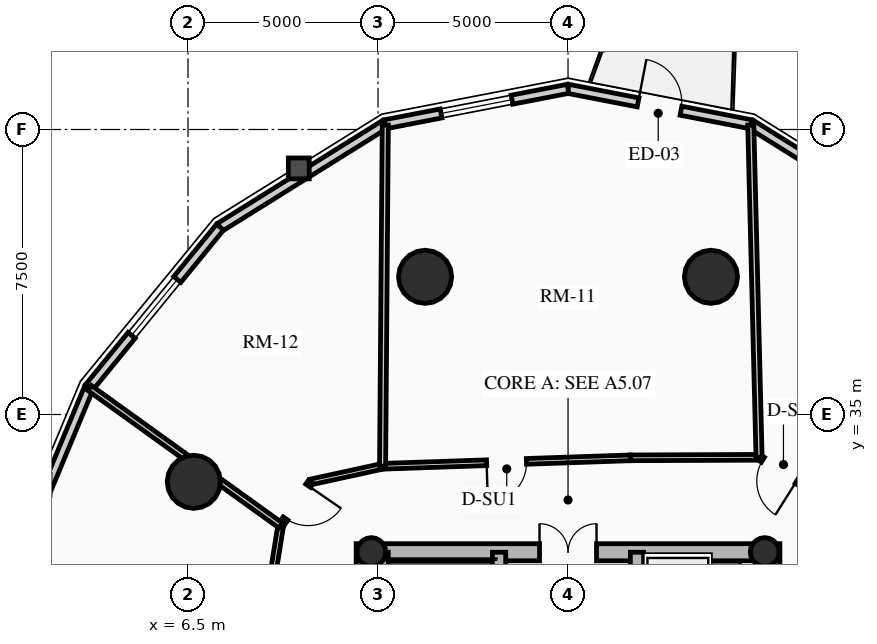
"""IFC4 building model, lengths in metres.
Left out: names, types, materials, properties, quantities, classifications, styles, units other than length and angle.
Written with IfcOpenShell. Run it as: python <this file> out.ifc"""

import sys

from ifc_helpers import new_model, si_unit, direction, frame, frame_2d, origin, origin_2d, place, context, subcontext, project, spatial, rectangle, circle, hollow_circle, extrude, source, transform, mapped, element, fill, save


model = new_model("IFC4")
c1 = context("Model", 3, precision=1e-05, world=origin(), true_north=direction((0.0, 1.0)))
c2 = subcontext(c1, "Body", "Model", "MODEL_VIEW")
j1 = project(units=[si_unit("LENGTHUNIT", "METRE"), si_unit("PLANEANGLEUNIT", "RADIAN")], contexts=[c1])
p1 = place(None, origin())
s1 = spatial("IfcSite", under=j1, at=p1, CompositionType="ELEMENT")
p2 = place(p1, origin())
s2 = spatial("IfcBuilding", under=s1, at=p2, CompositionType="ELEMENT")
p3 = place(p2, frame((0.0, 0.0, 78.88)))
s3 = spatial("IfcBuildingStorey", under=s2, at=p3, CompositionType="ELEMENT", Elevation=78.88)
for number, where, z_axis, x_axis in (
    (1, (11.15, 17.4, 0.0), (0.0, 0.0, 1.0), (0.0, 1.0, 0.0)),
    (2, (21.85, 17.4, 0.0), (0.0, 0.0, 1.0), (0.0, 1.0, 0.0)),
):
    element("IfcWall", number, at=place(p3, frame(where, z_axis=z_axis, x_axis=x_axis)), inside=s3, PredefinedType="SHEAR", context=c2, shape_type="SweptSolid", body=[
        extrude(rectangle(XDim=14.2, YDim=0.45, at=frame_2d((7.1, 0.0))), origin(), (0.0, 0.0, 1.0), 2.91),
    ])
p4 = place(p3, frame((11.15, 31.375, 0.0), z_axis=(0.0, 0.0, 1.0), x_axis=(1.0, 0.0, 0.0)))
e3 = element("IfcWall", 3, at=p4, inside=s3, PredefinedType="SHEAR", context=c2, shape_type="SweptSolid", body=[
    extrude(rectangle(XDim=10.7, YDim=0.45, at=frame_2d((5.35, 0.0))), origin(), (0.0, 0.0, 1.0), 2.91),
])
m1 = source(origin(), c2, "Body", "SweptSolid", [
    extrude(rectangle(XDim=1.5, YDim=2.02, at=frame_2d((0.75, 1.01))), frame((0.0, 0.235, 0.0), z_axis=(0.0, -1.0, 0.0), x_axis=(1.0, 0.0, 0.0)), (0.0, 0.0, 1.0), 0.47),
])
p5 = place(p4, frame((4.6, 0.0, 0.0)))
e4 = element("IfcOpeningElement", 4, at=p5, cuts=e3, PredefinedType="OPENING", context=c2, shape_type="MappedRepresentation", body=[
    mapped(m1, transform((0.0, 0.0, 0.0), x_axis=(1.0, 0.0, 0.0), y_axis=(0.0, 1.0, 0.0), z_axis=(0.0, 0.0, 1.0), scale=1.0)),
])
p6 = place(p3, frame((14.685, 17.625, 0.0), z_axis=(0.0, 0.0, 1.0), x_axis=(0.0, 1.0, 0.0)))
e5 = element("IfcWall", 5, at=p6, inside=s3, PredefinedType="SHEAR", context=c2, shape_type="SweptSolid", body=[
    extrude(rectangle(XDim=13.75, YDim=0.35, at=frame_2d((6.875, 0.0))), origin(), (0.0, 0.0, 1.0), 2.91),
])
m2 = source(origin(), c2, "Body", "SweptSolid", [
    extrude(rectangle(XDim=1.1, YDim=2.015, at=frame_2d((0.55, 1.007))), frame((0.0, 0.185, 0.0), z_axis=(0.0, -1.0, 0.0), x_axis=(1.0, 0.0, 0.0)), (0.0, 0.0, 1.0), 0.37),
])
p7 = place(p6, frame((4.875, 0.0, 0.0)))
e6 = element("IfcOpeningElement", 6, at=p7, cuts=e5, PredefinedType="OPENING", context=c2, shape_type="MappedRepresentation", body=[
    mapped(m2, transform((0.0, 0.0, 0.0), x_axis=(1.0, 0.0, 0.0), y_axis=(0.0, 1.0, 0.0), z_axis=(0.0, 0.0, 1.0), scale=1.0)),
])
m3 = source(origin(), c2, "Body", "SweptSolid", [
    extrude(rectangle(XDim=1.15, YDim=2.02, at=frame_2d((0.575, 1.01))), frame((0.0, 0.185, 0.0), z_axis=(0.0, -1.0, 0.0), x_axis=(1.0, 0.0, 0.0)), (0.0, 0.0, 1.0), 0.37),
])
p8 = place(p6, frame((7.295, 0.0, 0.0)))
e7 = element("IfcOpeningElement", 7, at=p8, cuts=e5, PredefinedType="OPENING", context=c2, shape_type="MappedRepresentation", body=[
    mapped(m3, transform((0.0, 0.0, 0.0), x_axis=(1.0, 0.0, 0.0), y_axis=(0.0, 1.0, 0.0), z_axis=(0.0, 0.0, 1.0), scale=1.0)),
])
p9 = place(p3, frame((18.315, 17.625, 0.0), z_axis=(0.0, 0.0, 1.0), x_axis=(0.0, 1.0, 0.0)))
e8 = element("IfcWall", 8, at=p9, inside=s3, PredefinedType="SHEAR", context=c2, shape_type="SweptSolid", body=[
    extrude(rectangle(XDim=13.75, YDim=0.35, at=frame_2d((6.875, 0.0))), origin(), (0.0, 0.0, 1.0), 2.91),
])
p10 = place(p9, frame((10.0, 0.0, 0.0)))
e9 = element("IfcOpeningElement", 9, at=p10, cuts=e8, PredefinedType="OPENING", context=c2, shape_type="MappedRepresentation", body=[
    mapped(m2, transform((0.0, 0.0, 0.0), x_axis=(1.0, 0.0, 0.0), y_axis=(0.0, 1.0, 0.0), z_axis=(0.0, 0.0, 1.0), scale=1.0)),
])
p11 = place(p9, frame((12.0, 0.0, 0.0)))
e10 = element("IfcOpeningElement", 10, at=p11, cuts=e8, PredefinedType="OPENING", context=c2, shape_type="MappedRepresentation", body=[
    mapped(m2, transform((0.0, 0.0, 0.0), x_axis=(1.0, 0.0, 0.0), y_axis=(0.0, 1.0, 0.0), z_axis=(0.0, 0.0, 1.0), scale=1.0)),
])
p12 = place(p9, frame((5.305, 0.0, 0.0)))
e11 = element("IfcOpeningElement", 11, at=p12, cuts=e8, PredefinedType="OPENING", context=c2, shape_type="MappedRepresentation", body=[
    mapped(m3, transform((0.0, 0.0, 0.0), x_axis=(1.0, 0.0, 0.0), y_axis=(0.0, 1.0, 0.0), z_axis=(0.0, 0.0, 1.0), scale=1.0)),
])
p13 = place(p3, frame((11.595, 24.655, 0.0), z_axis=(0.0, 0.0, 1.0), x_axis=(0.0, 1.0, 0.0)))
e12 = element("IfcWall", 12, at=p13, inside=s3, PredefinedType="SHEAR", context=c2, shape_type="SweptSolid", body=[
    extrude(rectangle(XDim=6.72, YDim=0.35, at=frame_2d((3.36, 0.0))), origin(), (0.0, 0.0, 1.0), 2.91),
])
for number, where, z_axis, x_axis in (
    (13, (11.325, 31.38, 0.0), (0.0, 0.0, 1.0), (1.0, 0.0, 0.0)),
    (14, (21.675, 31.38, 0.0), (0.0, 0.0, 1.0), (1.0, 0.0, 0.0)),
):
    element("IfcColumn", number, at=place(p3, frame(where, z_axis=z_axis, x_axis=x_axis)), inside=s3, PredefinedType="COLUMN", context=c2, shape_type="SweptSolid", body=[
        extrude(hollow_circle(Radius=0.38, WallThickness=0.032, at=origin_2d()), origin(), (0.0, 0.0, 1.0), 2.91),
    ])
for number, where, z_axis, x_axis in (
    (15, (20.261, 38.623, 0.0), (0.0, 0.0, 1.0), (1.0, 0.0, 0.0)),
    (16, (12.739, 38.623, 0.0), (0.0, 0.0, 1.0), (1.0, 0.0, 0.0)),
    (17, (6.653, 33.229, 0.0), (0.0, 0.0, 1.0), (1.0, 0.0, 0.0)),
):
    element("IfcColumn", number, at=place(p3, frame(where, z_axis=z_axis, x_axis=x_axis)), inside=s3, PredefinedType="USERDEFINED", context=c2, shape_type="SweptSolid", body=[
        extrude(circle(Radius=0.7, at=origin_2d()), origin(), (0.0, 0.0, 1.0), 2.91),
    ])
p14 = place(p3, frame((21.315, 42.637, 0.0), z_axis=(0.0, 0.0, 1.0), x_axis=(0.848520380187, -0.529162701263, 0.0)))
e18 = element("IfcWall", 18, at=p14, inside=s3, PredefinedType="SOLIDWALL", context=c2, shape_type="SweptSolid", body=[
    extrude(rectangle(XDim=5.119, YDim=0.24, at=frame_2d((2.56, 0.0))), origin(), (0.0, 0.0, 1.0), 2.179),
])
p15 = place(p3, frame((16.5, 43.57, 0.0), z_axis=(0.0, 0.0, 1.0), x_axis=(0.981723785992, -0.190311344954, 0.0)))
e19 = element("IfcWall", 19, at=p15, inside=s3, PredefinedType="SOLIDWALL", context=c2, shape_type="SweptSolid", body=[
    extrude(rectangle(XDim=4.904, YDim=0.24, at=frame_2d((2.452, 0.0))), origin(), (0.0, 0.0, 1.0), 2.179),
])
m4 = source(origin(), c2, "Body", "SweptSolid", [
    extrude(rectangle(XDim=1.15, YDim=2.005, at=frame_2d((0.575, 1.002))), frame((0.0, 0.13, 0.0), z_axis=(0.0, -1.0, 0.0), x_axis=(1.0, 0.0, 0.0)), (0.0, 0.0, 1.0), 0.26),
])
p16 = place(p15, frame((1.877, 0.0, 0.0)))
e20 = element("IfcOpeningElement", 20, at=p16, cuts=e19, PredefinedType="OPENING", context=c2, shape_type="MappedRepresentation", body=[
    mapped(m4, transform((0.0, 0.0, 0.0), x_axis=(1.0, 0.0, 0.0), y_axis=(0.0, 1.0, 0.0), z_axis=(0.0, 0.0, 1.0), scale=1.0)),
])
p17 = place(p3, frame((11.685, 42.637, 0.0), z_axis=(0.0, 0.0, 1.0), x_axis=(0.981723785992, 0.190311344954, 0.0)))
e21 = element("IfcWall", 21, at=p17, inside=s3, PredefinedType="SOLIDWALL", context=c2, shape_type="SweptSolid", body=[
    extrude(rectangle(XDim=4.904, YDim=0.24, at=frame_2d((2.452, 0.0))), origin(), (0.0, 0.0, 1.0), 2.179),
])
m5 = source(origin(), c2, "Body", "SweptSolid", [
    extrude(rectangle(XDim=1.9, YDim=1.35, at=frame_2d((0.95, 0.675))), frame((0.0, 0.13, 0.0), z_axis=(0.0, -1.0, 0.0), x_axis=(1.0, 0.0, 0.0)), (0.0, 0.0, 1.0), 0.26),
])
p18 = place(p17, frame((1.502, 0.0, 0.65)))
e22 = element("IfcOpeningElement", 22, at=p18, cuts=e21, PredefinedType="OPENING", context=c2, shape_type="MappedRepresentation", body=[
    mapped(m5, transform((0.0, 0.0, 0.0), x_axis=(1.0, 0.0, 0.0), y_axis=(0.0, 1.0, 0.0), z_axis=(0.0, 0.0, 1.0), scale=1.0)),
])
p19 = place(p3, frame((7.342, 39.928, 0.0), z_axis=(0.0, 0.0, 1.0), x_axis=(0.848520380187, 0.529162701263, 0.0)))
e23 = element("IfcWall", 23, at=p19, inside=s3, PredefinedType="SOLIDWALL", context=c2, shape_type="SweptSolid", body=[
    extrude(rectangle(XDim=5.119, YDim=0.24, at=frame_2d((2.56, 0.0))), origin(), (0.0, 0.0, 1.0), 2.179),
])
p20 = place(p3, frame((3.895, 35.709, 0.0), z_axis=(0.0, 0.0, 1.0), x_axis=(0.632700781152, 0.77439635945, 0.0)))
e24 = element("IfcWall", 24, at=p20, inside=s3, PredefinedType="SOLIDWALL", context=c2, shape_type="SweptSolid", body=[
    extrude(rectangle(XDim=5.448, YDim=0.24, at=frame_2d((2.724, 0.0))), origin(), (0.0, 0.0, 1.0), 2.179),
])
p21 = place(p20, frame((1.774, 0.0, 0.65)))
e25 = element("IfcOpeningElement", 25, at=p21, cuts=e24, PredefinedType="OPENING", context=c2, shape_type="MappedRepresentation", body=[
    mapped(m5, transform((0.0, 0.0, 0.0), x_axis=(1.0, 0.0, 0.0), y_axis=(0.0, 1.0, 0.0), z_axis=(0.0, 0.0, 1.0), scale=1.0)),
])
p22 = place(p3, frame((1.682, 30.393, 0.0), z_axis=(0.0, 0.0, 1.0), x_axis=(0.384344417632, 0.923189779317, 0.0)))
e26 = element("IfcWall", 26, at=p22, inside=s3, PredefinedType="SOLIDWALL", context=c2, shape_type="SweptSolid", body=[
    extrude(rectangle(XDim=5.758, YDim=0.24, at=frame_2d((2.879, 0.0))), origin(), (0.0, 0.0, 1.0), 2.179),
])
p23 = place(p3, frame((22.877, 33.022, 0.0), z_axis=(0.0, 0.0, 1.0), x_axis=(-0.845895608855, 0.533348496689, 0.0)))
e27 = element("IfcWall", 27, at=p23, inside=s3, PredefinedType="PARTITIONING", context=c2, shape_type="SweptSolid", body=[
    extrude(rectangle(XDim=1.597, YDim=0.15, at=frame_2d((0.798, 0.0))), origin(), (0.0, 0.0, 1.0), 2.225),
])
m6 = source(origin(), c2, "Body", "SweptSolid", [
    extrude(rectangle(XDim=1.05, YDim=2.015, at=frame_2d((0.525, 1.007))), frame((0.0, 0.085, 0.0), z_axis=(0.0, -1.0, 0.0), x_axis=(1.0, 0.0, 0.0)), (0.0, 0.0, 1.0), 0.17),
])
p24 = place(p23, frame((0.427, 0.0, 0.0)))
e28 = element("IfcOpeningElement", 28, at=p24, cuts=e27, PredefinedType="OPENING", context=c2, shape_type="MappedRepresentation", body=[
    mapped(m6, transform((0.0, 0.0, 0.0), x_axis=(1.0, 0.0, 0.0), y_axis=(0.0, 1.0, 0.0), z_axis=(0.0, 0.0, 1.0), scale=1.0)),
])
p25 = place(p3, frame((21.527, 33.873, 0.0), z_axis=(0.0, 0.0, 1.0), x_axis=(-0.999991838845, -0.004040079574, 0.0)))
e29 = element("IfcWall", 29, at=p25, inside=s3, PredefinedType="PARTITIONING", context=c2, shape_type="SweptSolid", body=[
    extrude(rectangle(XDim=3.384, YDim=0.15, at=frame_2d((1.692, 0.0))), origin(), (0.0, 0.0, 1.0), 2.225),
])
p26 = place(p3, frame((18.143, 33.86, 0.0), z_axis=(0.0, 0.0, 1.0), x_axis=(-0.999419208319, -0.034077060363, 0.0)))
e30 = element("IfcWall", 30, at=p26, inside=s3, PredefinedType="PARTITIONING", context=c2, shape_type="SweptSolid", body=[
    extrude(rectangle(XDim=6.527, YDim=0.15, at=frame_2d((3.263, 0.0))), origin(), (0.0, 0.0, 1.0), 2.225),
])
p27 = place(p26, frame((2.738, 0.0, 0.0)))
e31 = element("IfcOpeningElement", 31, at=p27, cuts=e30, PredefinedType="OPENING", context=c2, shape_type="MappedRepresentation", body=[
    mapped(m6, transform((0.0, 0.0, 0.0), x_axis=(1.0, 0.0, 0.0), y_axis=(0.0, 1.0, 0.0), z_axis=(0.0, 0.0, 1.0), scale=1.0)),
])
p28 = place(p3, frame((11.62, 33.637, 0.0), z_axis=(0.0, 0.0, 1.0), x_axis=(-0.97702579435, -0.213121085711, 0.0)))
e32 = element("IfcWall", 32, at=p28, inside=s3, PredefinedType="PARTITIONING", context=c2, shape_type="SweptSolid", body=[
    extrude(rectangle(XDim=1.935, YDim=0.15, at=frame_2d((0.967, 0.0))), origin(), (0.0, 0.0, 1.0), 2.225),
])
p29 = place(p3, frame((9.729, 33.225, 0.0), z_axis=(0.0, 0.0, 1.0), x_axis=(-0.567183649484, -0.82359134755, 0.0)))
e33 = element("IfcWall", 33, at=p29, inside=s3, PredefinedType="PARTITIONING", context=c2, shape_type="SweptSolid", body=[
    extrude(rectangle(XDim=1.392, YDim=0.15, at=frame_2d((0.696, 0.0))), origin(), (0.0, 0.0, 1.0), 2.225),
])
p30 = place(p29, frame((0.12, 0.0, 0.0)))
e34 = element("IfcOpeningElement", 34, at=p30, cuts=e33, PredefinedType="OPENING", context=c2, shape_type="MappedRepresentation", body=[
    mapped(m6, transform((0.0, 0.0, 0.0), x_axis=(1.0, 0.0, 0.0), y_axis=(0.0, 1.0, 0.0), z_axis=(0.0, 0.0, 1.0), scale=1.0)),
])
p31 = place(p3, frame((8.94, 32.078, 0.0), z_axis=(0.0, 0.0, 1.0), x_axis=(-0.159148467753, -0.98725466077, 0.0)))
e35 = element("IfcWall", 35, at=p31, inside=s3, PredefinedType="PARTITIONING", context=c2, shape_type="SweptSolid", body=[
    extrude(rectangle(XDim=1.554, YDim=0.15, at=frame_2d((0.777, 0.0))), origin(), (0.0, 0.0, 1.0), 2.225),
])
p32 = place(p3, frame((21.527, 33.873, 0.0), z_axis=(0.0, 0.0, 1.0), x_axis=(-0.024952442794, 0.999688639327, 0.0)))
e36 = element("IfcWall", 36, at=p32, inside=s3, PredefinedType="PARTITIONING", context=c2, shape_type="SweptSolid", body=[
    extrude(rectangle(XDim=8.747, YDim=0.16, at=frame_2d((4.374, 0.0))), origin(), (0.0, 0.0, 1.0), 2.179),
])
p33 = place(p3, frame((11.62, 33.637, 0.0), z_axis=(0.0, 0.0, 1.0), x_axis=(0.007965167065, 0.999968277554, 0.0)))
e37 = element("IfcWall", 37, at=p33, inside=s3, PredefinedType="PARTITIONING", context=c2, shape_type="SweptSolid", body=[
    extrude(rectangle(XDim=8.981, YDim=0.16, at=frame_2d((4.49, 0.0))), origin(), (0.0, 0.0, 1.0), 2.179),
])
p34 = place(p3, frame((8.94, 32.078, 0.0), z_axis=(0.0, 0.0, 1.0), x_axis=(-0.811689023641, 0.584089829479, 0.0)))
e38 = element("IfcWall", 38, at=p34, inside=s3, PredefinedType="PARTITIONING", context=c2, shape_type="SweptSolid", body=[
    extrude(rectangle(XDim=6.196, YDim=0.16, at=frame_2d((3.098, 0.0))), origin(), (0.0, 0.0, 1.0), 2.179),
])
m7 = source(origin(), c2, "Body", "SweptSolid", [
    extrude(rectangle(XDim=1.15, YDim=2.005, at=frame_2d((0.575, 1.002))), frame((0.0, 0.025, 0.0), z_axis=(0.0, -1.0, 0.0), x_axis=(1.0, 0.0, 0.0)), (0.0, 0.0, 1.0), 0.05),
])
p35 = place(p16, origin())
e39 = element("IfcDoor", 39, at=p35, inside=s3, OperationType="SINGLE_SWING_LEFT", PredefinedType="DOOR", context=c2, shape_type="MappedRepresentation", body=[
    mapped(m7, transform((0.0, 0.0, 0.0), x_axis=(1.0, 0.0, 0.0), y_axis=(0.0, 1.0, 0.0), z_axis=(0.0, 0.0, 1.0), scale=1.0)),
])
fill(e20, e39)
m8 = source(origin(), c2, "Body", "SweptSolid", [
    extrude(rectangle(XDim=1.9, YDim=1.35, at=frame_2d((0.95, 0.675))), frame((0.0, 0.03, 0.0), z_axis=(0.0, -1.0, 0.0), x_axis=(1.0, 0.0, 0.0)), (0.0, 0.0, 1.0), 0.06),
])
p36 = place(p18, origin())
e40 = element("IfcWindow", 40, at=p36, inside=s3, PartitioningType="DOUBLE_PANEL_VERTICAL", PredefinedType="WINDOW", context=c2, shape_type="MappedRepresentation", body=[
    mapped(m8, transform((0.0, 0.0, 0.0), x_axis=(1.0, 0.0, 0.0), y_axis=(0.0, 1.0, 0.0), z_axis=(0.0, 0.0, 1.0), scale=1.0)),
])
fill(e22, e40)
p37 = place(p21, origin())
e41 = element("IfcWindow", 41, at=p37, inside=s3, PartitioningType="DOUBLE_PANEL_VERTICAL", PredefinedType="WINDOW", context=c2, shape_type="MappedRepresentation", body=[
    mapped(m8, transform((0.0, 0.0, 0.0), x_axis=(1.0, 0.0, 0.0), y_axis=(0.0, 1.0, 0.0), z_axis=(0.0, 0.0, 1.0), scale=1.0)),
])
fill(e25, e41)
m9 = source(origin(), c2, "Body", "SweptSolid", [
    extrude(rectangle(XDim=1.5, YDim=2.02, at=frame_2d((0.75, 1.01))), frame((0.0, 0.025, 0.0), z_axis=(0.0, -1.0, 0.0), x_axis=(1.0, 0.0, 0.0)), (0.0, 0.0, 1.0), 0.05),
])
p38 = place(p5, origin())
e42 = element("IfcDoor", 42, at=p38, inside=s3, OperationType="DOUBLE_DOOR_SINGLE_SWING", PredefinedType="DOOR", context=c2, shape_type="MappedRepresentation", body=[
    mapped(m9, transform((0.0, 0.0, 0.0), x_axis=(1.0, 0.0, 0.0), y_axis=(0.0, 1.0, 0.0), z_axis=(0.0, 0.0, 1.0), scale=1.0)),
])
fill(e4, e42)
m10 = source(origin(), c2, "Body", "SweptSolid", [
    extrude(rectangle(XDim=1.05, YDim=2.015, at=frame_2d((0.525, 1.007))), frame((0.0, 0.025, 0.0), z_axis=(0.0, -1.0, 0.0), x_axis=(1.0, 0.0, 0.0)), (0.0, 0.0, 1.0), 0.05),
])
p39 = place(p24, origin())
e43 = element("IfcDoor", 43, at=p39, inside=s3, OperationType="SINGLE_SWING_LEFT", PredefinedType="DOOR", context=c2, shape_type="MappedRepresentation", body=[
    mapped(m10, transform((0.0, 0.0, 0.0), x_axis=(1.0, 0.0, 0.0), y_axis=(0.0, 1.0, 0.0), z_axis=(0.0, 0.0, 1.0), scale=1.0)),
])
fill(e28, e43)
p40 = place(p27, origin())
e44 = element("IfcDoor", 44, at=p40, inside=s3, OperationType="SINGLE_SWING_RIGHT", PredefinedType="DOOR", context=c2, shape_type="MappedRepresentation", body=[
    mapped(m10, transform((0.0, 0.0, 0.0), x_axis=(1.0, 0.0, 0.0), y_axis=(0.0, 1.0, 0.0), z_axis=(0.0, 0.0, 1.0), scale=1.0)),
])
fill(e31, e44)
p41 = place(p30, origin())
e45 = element("IfcDoor", 45, at=p41, inside=s3, OperationType="SINGLE_SWING_LEFT", PredefinedType="DOOR", context=c2, shape_type="MappedRepresentation", body=[
    mapped(m10, transform((0.0, 0.0, 0.0), x_axis=(1.0, 0.0, 0.0), y_axis=(0.0, 1.0, 0.0), z_axis=(0.0, 0.0, 1.0), scale=1.0)),
])
fill(e34, e45)
save(model, sys.argv[1])
